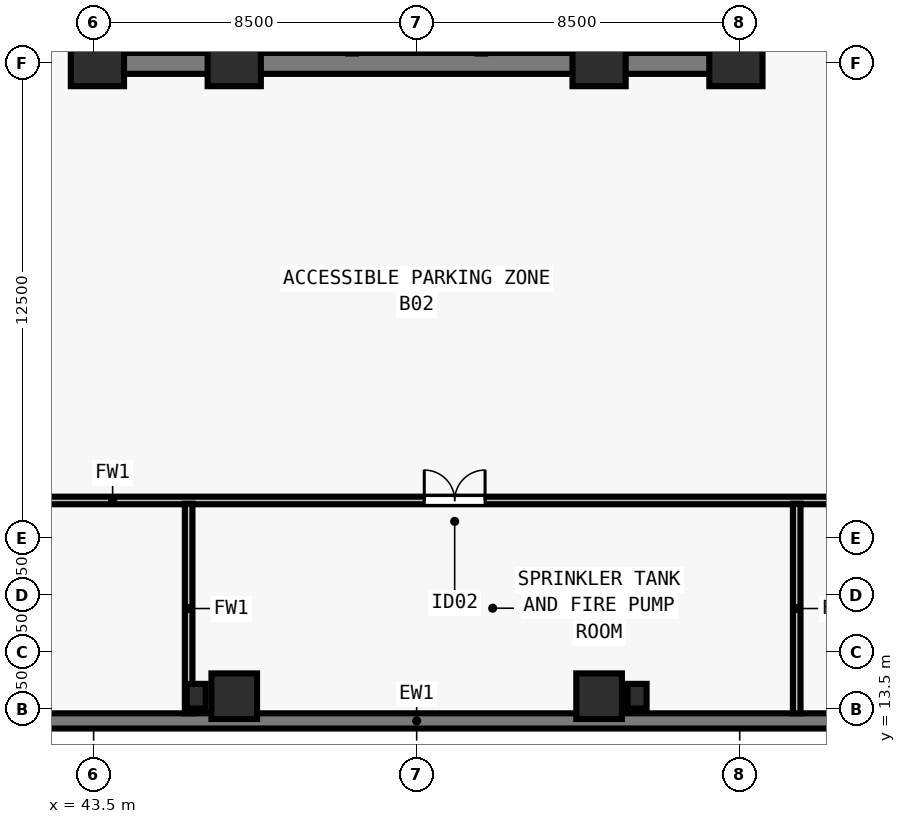
"""IFC4 building model, lengths in metres.
Left out: names, types, materials, properties, quantities, classifications, styles, units other than length and angle.
Written with IfcOpenShell. Run it as: python <this file> out.ifc"""

import sys

from ifc_helpers import new_model, si_unit, direction, frame, frame_2d, origin, origin_2d, place, context, subcontext, project, spatial, rectangle, extrude, element, fill, save


model = new_model("IFC4")
c1 = context("Model", 3, precision=1e-05, world=origin(), true_north=direction((0.0, 1.0)))
c2 = subcontext(c1, "Body", "Model", "MODEL_VIEW")
j1 = project(units=[si_unit("LENGTHUNIT", "METRE"), si_unit("PLANEANGLEUNIT", "RADIAN")], contexts=[c1])
p1 = place(None, origin())
s1 = spatial("IfcSite", under=j1, at=p1, CompositionType="ELEMENT")
p2 = place(p1, origin())
s2 = spatial("IfcBuilding", under=s1, at=p2, CompositionType="ELEMENT")
p3 = place(p2, frame((0.0, 0.0, -8.0)))
s3 = spatial("IfcBuildingStorey", under=s2, at=p3, CompositionType="ELEMENT", Elevation=-8.0)
for number, where, z_axis, x_axis in (
    (1, (43.6, 30.6, 0.0), (0.0, 0.0, 1.0), (1.0, 0.0, 0.0)),
    (2, (47.2, 30.6, 0.0), (0.0, 0.0, 1.0), (1.0, 0.0, 0.0)),
    (3, (56.8, 30.6, 0.0), (0.0, 0.0, 1.0), (1.0, 0.0, 0.0)),
    (4, (60.4, 30.6, 0.0), (0.0, 0.0, 1.0), (1.0, 0.0, 0.0)),
):
    element("IfcColumn", number, at=place(p3, frame(where, z_axis=z_axis, x_axis=x_axis)), inside=s3, PredefinedType="COLUMN", context=c2, shape_type="SweptSolid", body=[
        extrude(rectangle(XDim=1.4, YDim=1.4, at=origin_2d()), origin(), (0.0, 0.0, 1.0), 4.0),
    ])
for number, where, z_axis, x_axis in (
    (5, (47.2, 13.85, 0.0), (0.0, 0.0, 1.0), (1.0, 0.0, 0.0)),
    (6, (56.8, 13.85, 0.0), (0.0, 0.0, 1.0), (1.0, 0.0, 0.0)),
):
    element("IfcColumn", number, at=place(p3, frame(where, z_axis=z_axis, x_axis=x_axis)), inside=s3, PredefinedType="COLUMN", context=c2, shape_type="SweptSolid", body=[
        extrude(rectangle(XDim=1.2, YDim=1.2, at=origin_2d()), origin(), (0.0, 0.0, 1.0), 4.0),
    ])
for number, where, z_axis, x_axis in (
    (7, (46.2, 13.85, 0.0), (0.0, 0.0, 1.0), (1.0, 0.0, 0.0)),
    (8, (57.8, 13.85, 0.0), (0.0, 0.0, 1.0), (1.0, 0.0, 0.0)),
):
    element("IfcColumn", number, at=place(p3, frame(where, z_axis=z_axis, x_axis=x_axis)), inside=s3, PredefinedType="PILASTER", context=c2, shape_type="SweptSolid", body=[
        extrude(rectangle(XDim=0.5, YDim=0.65, at=origin_2d()), origin(), (0.0, 0.0, 1.0), 4.0),
    ])
p4 = place(p3, frame((85.0, 13.2, 0.0), z_axis=(0.0, 0.0, 1.0), x_axis=(-1.0, 0.0, 0.0)))
e9 = element("IfcWall", 9, at=p4, inside=s3, PredefinedType="USERDEFINED", context=c2, shape_type="SweptSolid", body=[
    extrude(rectangle(XDim=66.0, YDim=0.4, at=frame_2d((33.0, 0.0))), origin(), (0.0, 0.0, 1.0), 3.72),
])
p5 = place(p3, frame((43.225, 30.5, 0.0), z_axis=(0.0, 0.0, 1.0), x_axis=(1.0, 0.0, 0.0)))
e10 = element("IfcWall", 10, at=p5, inside=s3, PredefinedType="SHEAR", context=c2, shape_type="SweptSolid", body=[
    extrude(rectangle(XDim=17.55, YDim=0.55, at=frame_2d((8.775, 0.0))), origin(), (0.0, 0.0, 1.0), 3.72),
])
for number, where, z_axis, x_axis in (
    (11, (43.5, 30.765, 0.0), (0.0, 0.0, 1.0), (0.0, 1.0, 0.0)),
    (12, (60.5, 30.765, 0.0), (0.0, 0.0, 1.0), (0.0, 1.0, 0.0)),
):
    element("IfcWall", number, at=place(p3, frame(where, z_axis=z_axis, x_axis=x_axis)), inside=s3, PredefinedType="SHEAR", context=c2, shape_type="SweptSolid", body=[
        extrude(rectangle(XDim=7.985, YDim=0.55, at=frame_2d((3.993, 0.0))), origin(), (0.0, 0.0, 1.0), 3.72),
    ])
for number, where, z_axis, x_axis in (
    (13, (50.3, 30.76, 0.0), (0.0, 0.0, 1.0), (0.0, 1.0, 0.0)),
    (14, (53.7, 30.76, 0.0), (0.0, 0.0, 1.0), (0.0, 1.0, 0.0)),
):
    element("IfcWall", number, at=place(p3, frame(where, z_axis=z_axis, x_axis=x_axis)), inside=s3, PredefinedType="SOLIDWALL", context=c2, shape_type="SweptSolid", body=[
        extrude(rectangle(XDim=7.855, YDim=0.2, at=frame_2d((3.927, 0.0))), origin(), (0.0, 0.0, 1.0), 3.72),
    ])
for number, where, z_axis, x_axis in (
    (15, (47.35, 30.76, 0.0), (0.0, 0.0, 1.0), (0.0, 1.0, 0.0)),
    (16, (56.65, 30.76, 0.0), (0.0, 0.0, 1.0), (0.0, 1.0, 0.0)),
):
    element("IfcWall", number, at=place(p3, frame(where, z_axis=z_axis, x_axis=x_axis)), inside=s3, PredefinedType="SOLIDWALL", context=c2, shape_type="SweptSolid", body=[
        extrude(rectangle(XDim=7.855, YDim=0.18, at=frame_2d((3.927, 0.0))), origin(), (0.0, 0.0, 1.0), 3.72),
    ])
p6 = place(p3, frame((26.2, 19.0, 0.0), z_axis=(0.0, 0.0, 1.0), x_axis=(1.0, 0.0, 0.0)))
e17 = element("IfcWall", 17, at=p6, inside=s3, PredefinedType="SOLIDWALL", context=c2, shape_type="SweptSolid", body=[
    extrude(rectangle(XDim=51.6, YDim=0.2, at=frame_2d((25.8, 0.0))), origin(), (0.0, 0.0, 1.0), 3.238),
])
p7 = place(p6, frame((8.0, 0.0, 0.0)))
e18 = element("IfcOpeningElement", 18, at=p7, cuts=e17, PredefinedType="OPENING", context=c2, shape_type="SweptSolid", body=[
    extrude(rectangle(XDim=1.6, YDim=2.2, at=frame_2d((0.8, 1.1))), frame((0.0, 0.11, 0.0), z_axis=(0.0, -1.0, 0.0), x_axis=(1.0, 0.0, 0.0)), (0.0, 0.0, 1.0), 0.22),
])
p8 = place(p6, frame((26.0, 0.0, 0.0)))
e19 = element("IfcOpeningElement", 19, at=p8, cuts=e17, PredefinedType="OPENING", context=c2, shape_type="SweptSolid", body=[
    extrude(rectangle(XDim=1.6, YDim=2.2, at=frame_2d((0.8, 1.1))), frame((0.0, 0.11, 0.0), z_axis=(0.0, -1.0, 0.0), x_axis=(1.0, 0.0, 0.0)), (0.0, 0.0, 1.0), 0.22),
])
p9 = place(p6, frame((42.0, 0.0, 0.0)))
e20 = element("IfcOpeningElement", 20, at=p9, cuts=e17, PredefinedType="OPENING", context=c2, shape_type="SweptSolid", body=[
    extrude(rectangle(XDim=1.6, YDim=2.2, at=frame_2d((0.8, 1.1))), frame((0.0, 0.11, 0.0), z_axis=(0.0, -1.0, 0.0), x_axis=(1.0, 0.0, 0.0)), (0.0, 0.0, 1.0), 0.22),
])
for number, where, z_axis, x_axis in (
    (21, (46.0, 13.4, 0.0), (0.0, 0.0, 1.0), (0.0, 1.0, 0.0)),
    (22, (62.0, 13.4, 0.0), (0.0, 0.0, 1.0), (0.0, 1.0, 0.0)),
):
    element("IfcWall", number, at=place(p3, frame(where, z_axis=z_axis, x_axis=x_axis)), inside=s3, PredefinedType="SOLIDWALL", context=c2, shape_type="SweptSolid", body=[
        extrude(rectangle(XDim=5.515, YDim=0.2, at=frame_2d((2.758, 0.0))), origin(), (0.0, 0.0, 1.0), 3.72),
    ])
for number, where, z_axis, x_axis in (
    (23, (47.07, 38.78, 0.0), (0.0, 0.0, 1.0), (0.0, -1.0, 0.0)),
    (24, (56.93, 38.78, 0.0), (0.0, 0.0, 1.0), (0.0, -1.0, 0.0)),
):
    element("IfcWall", number, at=place(p3, frame(where, z_axis=z_axis, x_axis=x_axis)), inside=s3, PredefinedType="SOLIDWALL", context=c2, shape_type="SweptSolid", body=[
        extrude(rectangle(XDim=8.017, YDim=0.18, at=frame_2d((4.009, 0.0))), origin(), (0.0, 0.0, 1.0), 3.72),
    ])
p10 = place(p8, origin())
e25 = element("IfcDoor", 25, at=p10, inside=s3, OperationType="DOUBLE_DOOR_SINGLE_SWING", PredefinedType="DOOR", context=c2, shape_type="SweptSolid", body=[
    extrude(rectangle(XDim=1.6, YDim=2.2, at=frame_2d((0.8, 1.1))), frame((0.0, 0.025, 0.0), z_axis=(0.0, -1.0, 0.0), x_axis=(1.0, 0.0, 0.0)), (0.0, 0.0, 1.0), 0.05),
])
fill(e19, e25)
save(model, sys.argv[1])
